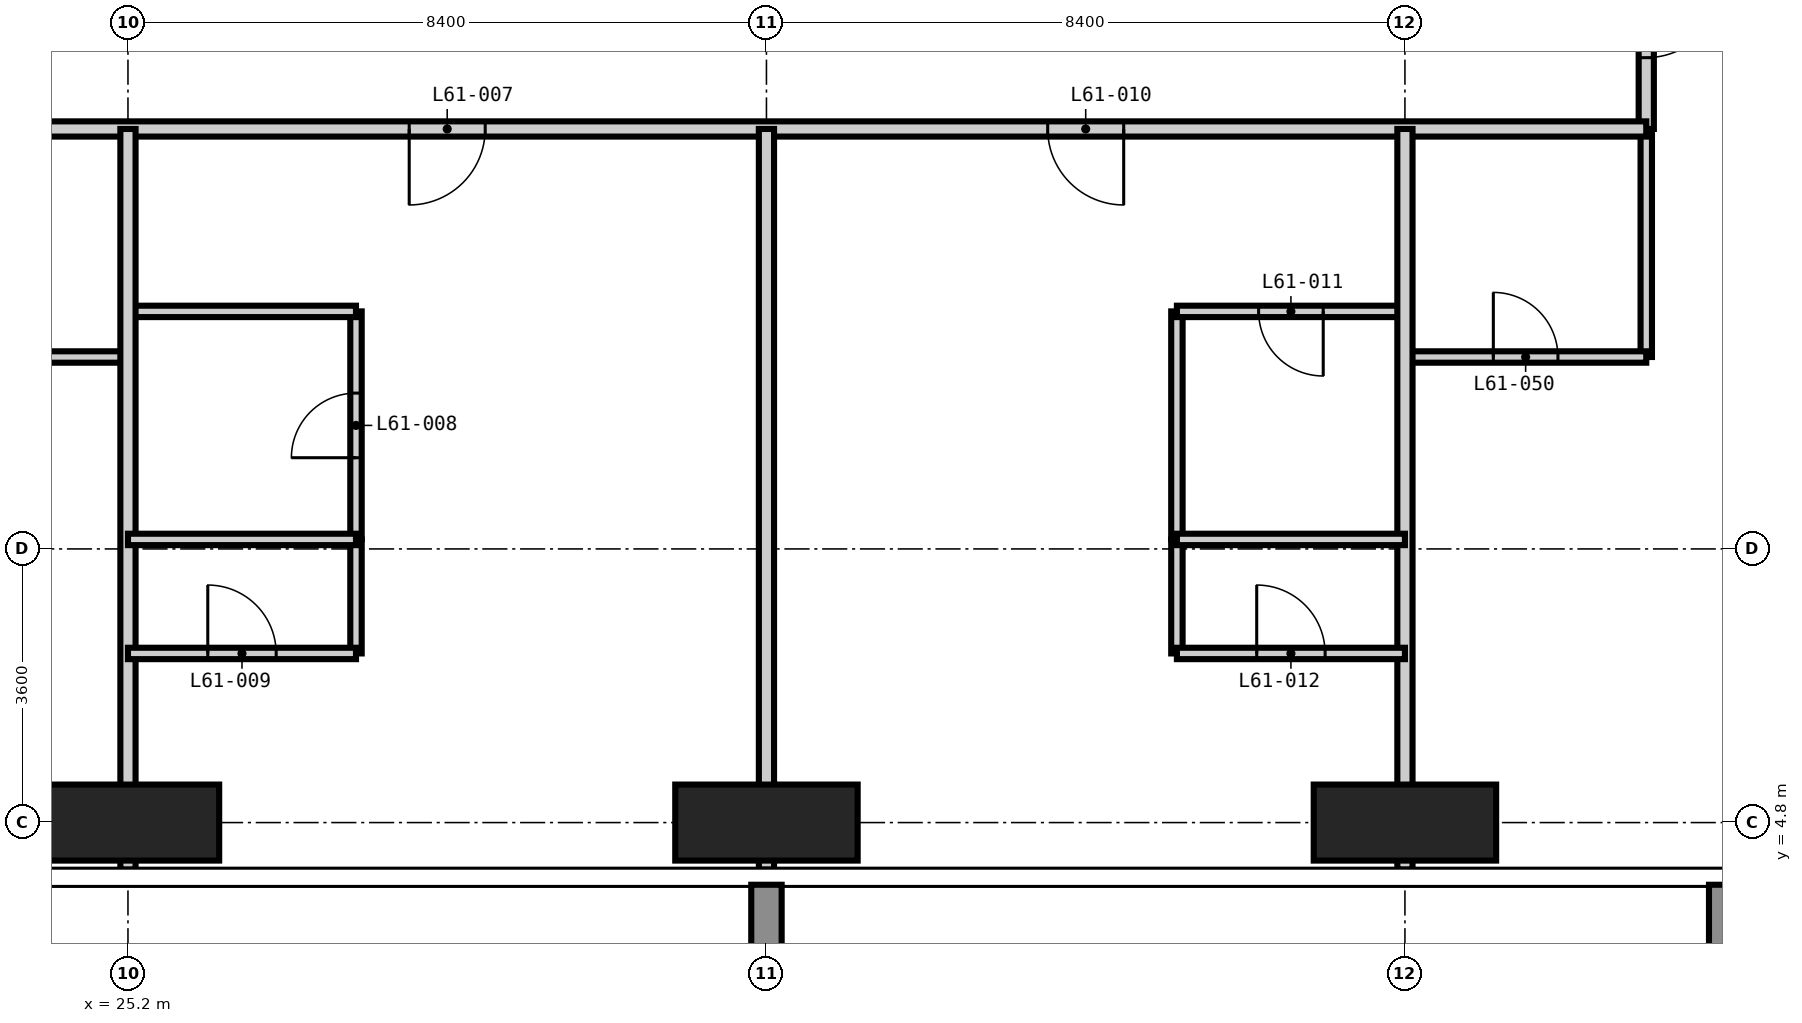
"""IFC4 building model, lengths in metres.
Left out: names, types, materials, properties, quantities, classifications, styles, units other than length and angle.
Written with IfcOpenShell. Run it as: python <this file> out.ifc"""

import sys

from ifc_helpers import new_model, si_unit, direction, frame, frame_2d, origin, origin_2d, place, context, subcontext, project, spatial, rectangle, extrude, element, fill, save


model = new_model("IFC4")
c1 = context("Model", 3, precision=1e-05, world=origin(), true_north=direction((0.0, 1.0)))
c2 = subcontext(c1, "Body", "Model", "MODEL_VIEW")
j1 = project(units=[si_unit("LENGTHUNIT", "METRE"), si_unit("PLANEANGLEUNIT", "RADIAN")], contexts=[c1])
p1 = place(None, origin())
s1 = spatial("IfcSite", under=j1, at=p1, CompositionType="ELEMENT")
p2 = place(p1, origin())
s2 = spatial("IfcBuilding", under=s1, at=p2, CompositionType="ELEMENT")
p3 = place(p2, frame((0.0, 0.0, 237.3)))
s3 = spatial("IfcBuildingStorey", under=s2, at=p3, CompositionType="ELEMENT", Elevation=237.3)
for number, where, z_axis, x_axis in (
    (1, (25.2, 4.8, -0.35), (0.0, 0.0, 1.0), (1.0, 0.0, 0.0)),
    (2, (33.6, 4.8, -0.35), (0.0, 0.0, 1.0), (1.0, 0.0, 0.0)),
    (3, (42.0, 4.8, -0.35), (0.0, 0.0, 1.0), (1.0, 0.0, 0.0)),
):
    element("IfcColumn", number, at=place(p3, frame(where, z_axis=z_axis, x_axis=x_axis)), inside=s3, PredefinedType="COLUMN", context=c2, shape_type="SweptSolid", body=[
        extrude(rectangle(XDim=2.4, YDim=1.0, at=origin_2d()), origin(), (0.0, 0.0, 1.0), 3.9),
    ])
p4 = place(p3, frame((28.2, 8.525, 0.0), z_axis=(0.0, 0.0, 1.0), x_axis=(0.0, 1.0, 0.0)))
e4 = element("IfcWall", 4, at=p4, inside=s3, PredefinedType="PARTITIONING", context=c2, shape_type="SweptSolid", body=[
    extrude(rectangle(XDim=3.0, YDim=0.15, at=frame_2d((1.5, 0.0))), origin(), (0.0, 0.0, 1.0), 3.55),
])
p5 = place(p4, frame((1.075, 0.0, 0.0)))
e5 = element("IfcOpeningElement", 5, at=p5, cuts=e4, PredefinedType="OPENING", context=c2, shape_type="SweptSolid", body=[
    extrude(rectangle(XDim=0.85, YDim=2.1, at=frame_2d((0.425, 1.05))), frame((0.0, 0.085, 0.0), z_axis=(0.0, -1.0, 0.0), x_axis=(1.0, 0.0, 0.0)), (0.0, 0.0, 1.0), 0.17),
])
for number, where, z_axis, x_axis in (
    (6, (39.0, 8.525, 0.0), (0.0, 0.0, 1.0), (0.0, 1.0, 0.0)),
    (7, (45.175, 10.925, 0.0), (0.0, 0.0, 1.0), (0.0, 1.0, 0.0)),
):
    element("IfcWall", number, at=place(p3, frame(where, z_axis=z_axis, x_axis=x_axis)), inside=s3, PredefinedType="PARTITIONING", context=c2, shape_type="SweptSolid", body=[
        extrude(rectangle(XDim=3.0, YDim=0.15, at=frame_2d((1.5, 0.0))), origin(), (0.0, 0.0, 1.0), 3.55),
    ])
p6 = place(p3, frame((22.325, 10.925, 0.0), z_axis=(0.0, 0.0, 1.0), x_axis=(1.0, 0.0, 0.0)))
e8 = element("IfcWall", 8, at=p6, inside=s3, PredefinedType="PARTITIONING", context=c2, shape_type="SweptSolid", body=[
    extrude(rectangle(XDim=2.875, YDim=0.15, at=frame_2d((1.438, 0.0))), origin(), (0.0, 0.0, 1.0), 3.55),
])
p7 = place(p3, frame((42.0, 10.925, 0.0), z_axis=(0.0, 0.0, 1.0), x_axis=(1.0, 0.0, 0.0)))
e9 = element("IfcWall", 9, at=p7, inside=s3, PredefinedType="PARTITIONING", context=c2, shape_type="SweptSolid", body=[
    extrude(rectangle(XDim=3.175, YDim=0.15, at=frame_2d((1.587, 0.0))), origin(), (0.0, 0.0, 1.0), 3.55),
])
p8 = place(p7, frame((1.163, 0.0, 0.0)))
e10 = element("IfcOpeningElement", 10, at=p8, cuts=e9, PredefinedType="OPENING", context=c2, shape_type="SweptSolid", body=[
    extrude(rectangle(XDim=0.85, YDim=2.1, at=frame_2d((0.425, 1.05))), frame((0.0, 0.085, 0.0), z_axis=(0.0, -1.0, 0.0), x_axis=(1.0, 0.0, 0.0)), (0.0, 0.0, 1.0), 0.17),
])
p9 = place(p3, frame((25.2, 11.525, 0.0), z_axis=(0.0, 0.0, 1.0), x_axis=(1.0, 0.0, 0.0)))
e11 = element("IfcWall", 11, at=p9, inside=s3, PredefinedType="PARTITIONING", context=c2, shape_type="SweptSolid", body=[
    extrude(rectangle(XDim=3.0, YDim=0.15, at=frame_2d((1.5, 0.0))), origin(), (0.0, 0.0, 1.0), 3.55),
])
p10 = place(p3, frame((39.0, 11.525, 0.0), z_axis=(0.0, 0.0, 1.0), x_axis=(1.0, 0.0, 0.0)))
e12 = element("IfcWall", 12, at=p10, inside=s3, PredefinedType="PARTITIONING", context=c2, shape_type="SweptSolid", body=[
    extrude(rectangle(XDim=3.0, YDim=0.15, at=frame_2d((1.5, 0.0))), origin(), (0.0, 0.0, 1.0), 3.55),
])
p11 = place(p10, frame((1.075, 0.0, 0.0)))
e13 = element("IfcOpeningElement", 13, at=p11, cuts=e12, PredefinedType="OPENING", context=c2, shape_type="SweptSolid", body=[
    extrude(rectangle(XDim=0.85, YDim=2.1, at=frame_2d((0.425, 1.05))), frame((0.0, 0.085, 0.0), z_axis=(0.0, -1.0, 0.0), x_axis=(1.0, 0.0, 0.0)), (0.0, 0.0, 1.0), 0.17),
])
p12 = place(p3, frame((45.175, 29.4, 0.0), z_axis=(0.0, 0.0, 1.0), x_axis=(0.0, -1.0, 0.0)))
e14 = element("IfcWall", 14, at=p12, inside=s3, PredefinedType="PARTITIONING", context=c2, shape_type="SweptSolid", body=[
    extrude(rectangle(XDim=15.475, YDim=0.2, at=frame_2d((7.737, 0.0))), origin(), (0.0, 0.0, 1.0), 3.55),
])
p13 = place(p12, frame((9.1, 0.0, 0.0)))
e15 = element("IfcOpeningElement", 15, at=p13, cuts=e14, PredefinedType="OPENING", context=c2, shape_type="SweptSolid", body=[
    extrude(rectangle(XDim=1.0, YDim=2.2, at=frame_2d((0.5, 1.1))), frame((0.0, 0.11, 0.0), z_axis=(0.0, -1.0, 0.0), x_axis=(1.0, 0.0, 0.0)), (0.0, 0.0, 1.0), 0.22),
])
p14 = place(p12, frame((13.537, 0.0, 0.0)))
e16 = element("IfcOpeningElement", 16, at=p14, cuts=e14, PredefinedType="OPENING", context=c2, shape_type="SweptSolid", body=[
    extrude(rectangle(XDim=1.0, YDim=2.2, at=frame_2d((0.5, 1.1))), frame((0.0, 0.11, 0.0), z_axis=(0.0, -1.0, 0.0), x_axis=(1.0, 0.0, 0.0)), (0.0, 0.0, 1.0), 0.22),
])
p15 = place(p3, frame((45.175, 13.925, 0.0), z_axis=(0.0, 0.0, 1.0), x_axis=(-1.0, 0.0, 0.0)))
e17 = element("IfcWall", 17, at=p15, inside=s3, PredefinedType="PARTITIONING", context=c2, shape_type="SweptSolid", body=[
    extrude(rectangle(XDim=22.85, YDim=0.2, at=frame_2d((11.425, 0.0))), origin(), (0.0, 0.0, 1.0), 3.55),
])
p16 = place(p15, frame((15.275, 0.0, 0.0)))
e18 = element("IfcOpeningElement", 18, at=p16, cuts=e17, PredefinedType="OPENING", context=c2, shape_type="SweptSolid", body=[
    extrude(rectangle(XDim=1.0, YDim=2.2, at=frame_2d((0.5, 1.1))), frame((0.0, 0.11, 0.0), z_axis=(0.0, -1.0, 0.0), x_axis=(1.0, 0.0, 0.0)), (0.0, 0.0, 1.0), 0.22),
])
p17 = place(p15, frame((6.875, 0.0, 0.0)))
e19 = element("IfcOpeningElement", 19, at=p17, cuts=e17, PredefinedType="OPENING", context=c2, shape_type="SweptSolid", body=[
    extrude(rectangle(XDim=1.0, YDim=2.2, at=frame_2d((0.5, 1.1))), frame((0.0, 0.11, 0.0), z_axis=(0.0, -1.0, 0.0), x_axis=(1.0, 0.0, 0.0)), (0.0, 0.0, 1.0), 0.22),
])
for number, where, z_axis, x_axis in (
    (20, (25.2, 4.182, 0.0), (0.0, 0.0, 1.0), (0.0, 1.0, 0.0)),
    (21, (33.6, 4.182, 0.0), (0.0, 0.0, 1.0), (0.0, 1.0, 0.0)),
    (22, (42.0, 4.182, 0.0), (0.0, 0.0, 1.0), (0.0, 1.0, 0.0)),
):
    element("IfcWall", number, at=place(p3, frame(where, z_axis=z_axis, x_axis=x_axis)), inside=s3, PredefinedType="PARTITIONING", context=c2, shape_type="SweptSolid", body=[
        extrude(rectangle(XDim=9.743, YDim=0.2, at=frame_2d((4.872, 0.0))), origin(), (0.0, 0.0, 1.0), 3.55),
    ])
for number, where, z_axis, x_axis in (
    (23, (28.2, 7.025, 0.0), (0.0, 0.0, 1.0), (0.0, 1.0, 0.0)),
    (24, (39.0, 7.025, 0.0), (0.0, 0.0, 1.0), (0.0, 1.0, 0.0)),
):
    element("IfcWall", number, at=place(p3, frame(where, z_axis=z_axis, x_axis=x_axis)), inside=s3, PredefinedType="PARTITIONING", context=c2, shape_type="SweptSolid", body=[
        extrude(rectangle(XDim=1.5, YDim=0.15, at=frame_2d((0.75, 0.0))), origin(), (0.0, 0.0, 1.0), 3.55),
    ])
p18 = place(p3, frame((25.2, 7.025, 0.0), z_axis=(0.0, 0.0, 1.0), x_axis=(1.0, 0.0, 0.0)))
e25 = element("IfcWall", 25, at=p18, inside=s3, PredefinedType="PARTITIONING", context=c2, shape_type="SweptSolid", body=[
    extrude(rectangle(XDim=3.0, YDim=0.15, at=frame_2d((1.5, 0.0))), origin(), (0.0, 0.0, 1.0), 3.55),
])
p19 = place(p18, frame((1.05, 0.0, 0.0)))
e26 = element("IfcOpeningElement", 26, at=p19, cuts=e25, PredefinedType="OPENING", context=c2, shape_type="SweptSolid", body=[
    extrude(rectangle(XDim=0.9, YDim=2.1, at=frame_2d((0.45, 1.05))), frame((0.0, 0.085, 0.0), z_axis=(0.0, -1.0, 0.0), x_axis=(1.0, 0.0, 0.0)), (0.0, 0.0, 1.0), 0.17),
])
p20 = place(p3, frame((39.0, 7.025, 0.0), z_axis=(0.0, 0.0, 1.0), x_axis=(1.0, 0.0, 0.0)))
e27 = element("IfcWall", 27, at=p20, inside=s3, PredefinedType="PARTITIONING", context=c2, shape_type="SweptSolid", body=[
    extrude(rectangle(XDim=3.0, YDim=0.15, at=frame_2d((1.5, 0.0))), origin(), (0.0, 0.0, 1.0), 3.55),
])
p21 = place(p20, frame((1.05, 0.0, 0.0)))
e28 = element("IfcOpeningElement", 28, at=p21, cuts=e27, PredefinedType="OPENING", context=c2, shape_type="SweptSolid", body=[
    extrude(rectangle(XDim=0.9, YDim=2.1, at=frame_2d((0.45, 1.05))), frame((0.0, 0.085, 0.0), z_axis=(0.0, -1.0, 0.0), x_axis=(1.0, 0.0, 0.0)), (0.0, 0.0, 1.0), 0.17),
])
for number, where, z_axis, x_axis in (
    (29, (25.2, 8.525, 0.0), (0.0, 0.0, 1.0), (1.0, 0.0, 0.0)),
    (30, (39.0, 8.525, 0.0), (0.0, 0.0, 1.0), (1.0, 0.0, 0.0)),
):
    element("IfcWall", number, at=place(p3, frame(where, z_axis=z_axis, x_axis=x_axis)), inside=s3, PredefinedType="PARTITIONING", context=c2, shape_type="SweptSolid", body=[
        extrude(rectangle(XDim=3.0, YDim=0.15, at=frame_2d((1.5, 0.0))), origin(), (0.0, 0.0, 1.0), 3.55),
    ])
p22 = place(p16, origin())
e31 = element("IfcDoor", 31, at=p22, inside=s3, OperationType="SINGLE_SWING_RIGHT", PredefinedType="DOOR", context=c2, shape_type="SweptSolid", body=[
    extrude(rectangle(XDim=1.0, YDim=2.2, at=frame_2d((0.5, 1.1))), frame((0.0, 0.025, 0.0), z_axis=(0.0, -1.0, 0.0), x_axis=(1.0, 0.0, 0.0)), (0.0, 0.0, 1.0), 0.05),
])
fill(e18, e31)
p23 = place(p5, origin())
e32 = element("IfcDoor", 32, at=p23, inside=s3, OperationType="SINGLE_SWING_LEFT", PredefinedType="DOOR", context=c2, shape_type="SweptSolid", body=[
    extrude(rectangle(XDim=0.85, YDim=2.1, at=frame_2d((0.425, 1.05))), frame((0.0, 0.025, 0.0), z_axis=(0.0, -1.0, 0.0), x_axis=(1.0, 0.0, 0.0)), (0.0, 0.0, 1.0), 0.05),
])
fill(e5, e32)
p24 = place(p19, origin())
e33 = element("IfcDoor", 33, at=p24, inside=s3, OperationType="SINGLE_SWING_LEFT", PredefinedType="DOOR", context=c2, shape_type="SweptSolid", body=[
    extrude(rectangle(XDim=0.9, YDim=2.1, at=frame_2d((0.45, 1.05))), frame((0.0, 0.025, 0.0), z_axis=(0.0, -1.0, 0.0), x_axis=(1.0, 0.0, 0.0)), (0.0, 0.0, 1.0), 0.05),
])
fill(e26, e33)
p25 = place(p17, origin())
e34 = element("IfcDoor", 34, at=p25, inside=s3, OperationType="SINGLE_SWING_LEFT", PredefinedType="DOOR", context=c2, shape_type="SweptSolid", body=[
    extrude(rectangle(XDim=1.0, YDim=2.2, at=frame_2d((0.5, 1.1))), frame((0.0, 0.025, 0.0), z_axis=(0.0, -1.0, 0.0), x_axis=(1.0, 0.0, 0.0)), (0.0, 0.0, 1.0), 0.05),
])
fill(e19, e34)
p26 = place(p11, frame((0.85, 0.0, 0.0), z_axis=(0.0, 0.0, 1.0), x_axis=(-1.0, 0.0, 0.0)))
e35 = element("IfcDoor", 35, at=p26, inside=s3, OperationType="SINGLE_SWING_LEFT", PredefinedType="DOOR", context=c2, shape_type="SweptSolid", body=[
    extrude(rectangle(XDim=0.85, YDim=2.1, at=frame_2d((0.425, 1.05))), frame((0.0, 0.025, 0.0), z_axis=(0.0, -1.0, 0.0), x_axis=(1.0, 0.0, 0.0)), (0.0, 0.0, 1.0), 0.05),
])
fill(e13, e35)
p27 = place(p21, origin())
e36 = element("IfcDoor", 36, at=p27, inside=s3, OperationType="SINGLE_SWING_LEFT", PredefinedType="DOOR", context=c2, shape_type="SweptSolid", body=[
    extrude(rectangle(XDim=0.9, YDim=2.1, at=frame_2d((0.45, 1.05))), frame((0.0, 0.025, 0.0), z_axis=(0.0, -1.0, 0.0), x_axis=(1.0, 0.0, 0.0)), (0.0, 0.0, 1.0), 0.05),
])
fill(e28, e36)
p28 = place(p14, origin())
e37 = element("IfcDoor", 37, at=p28, inside=s3, OperationType="SINGLE_SWING_LEFT", PredefinedType="DOOR", context=c2, shape_type="SweptSolid", body=[
    extrude(rectangle(XDim=1.0, YDim=2.2, at=frame_2d((0.5, 1.1))), frame((0.0, 0.025, 0.0), z_axis=(0.0, -1.0, 0.0), x_axis=(1.0, 0.0, 0.0)), (0.0, 0.0, 1.0), 0.05),
])
fill(e16, e37)
p29 = place(p8, origin())
e38 = element("IfcDoor", 38, at=p29, inside=s3, OperationType="SINGLE_SWING_LEFT", PredefinedType="DOOR", context=c2, shape_type="SweptSolid", body=[
    extrude(rectangle(XDim=0.85, YDim=2.1, at=frame_2d((0.425, 1.05))), frame((0.0, 0.025, 0.0), z_axis=(0.0, -1.0, 0.0), x_axis=(1.0, 0.0, 0.0)), (0.0, 0.0, 1.0), 0.05),
])
fill(e10, e38)
save(model, sys.argv[1])
